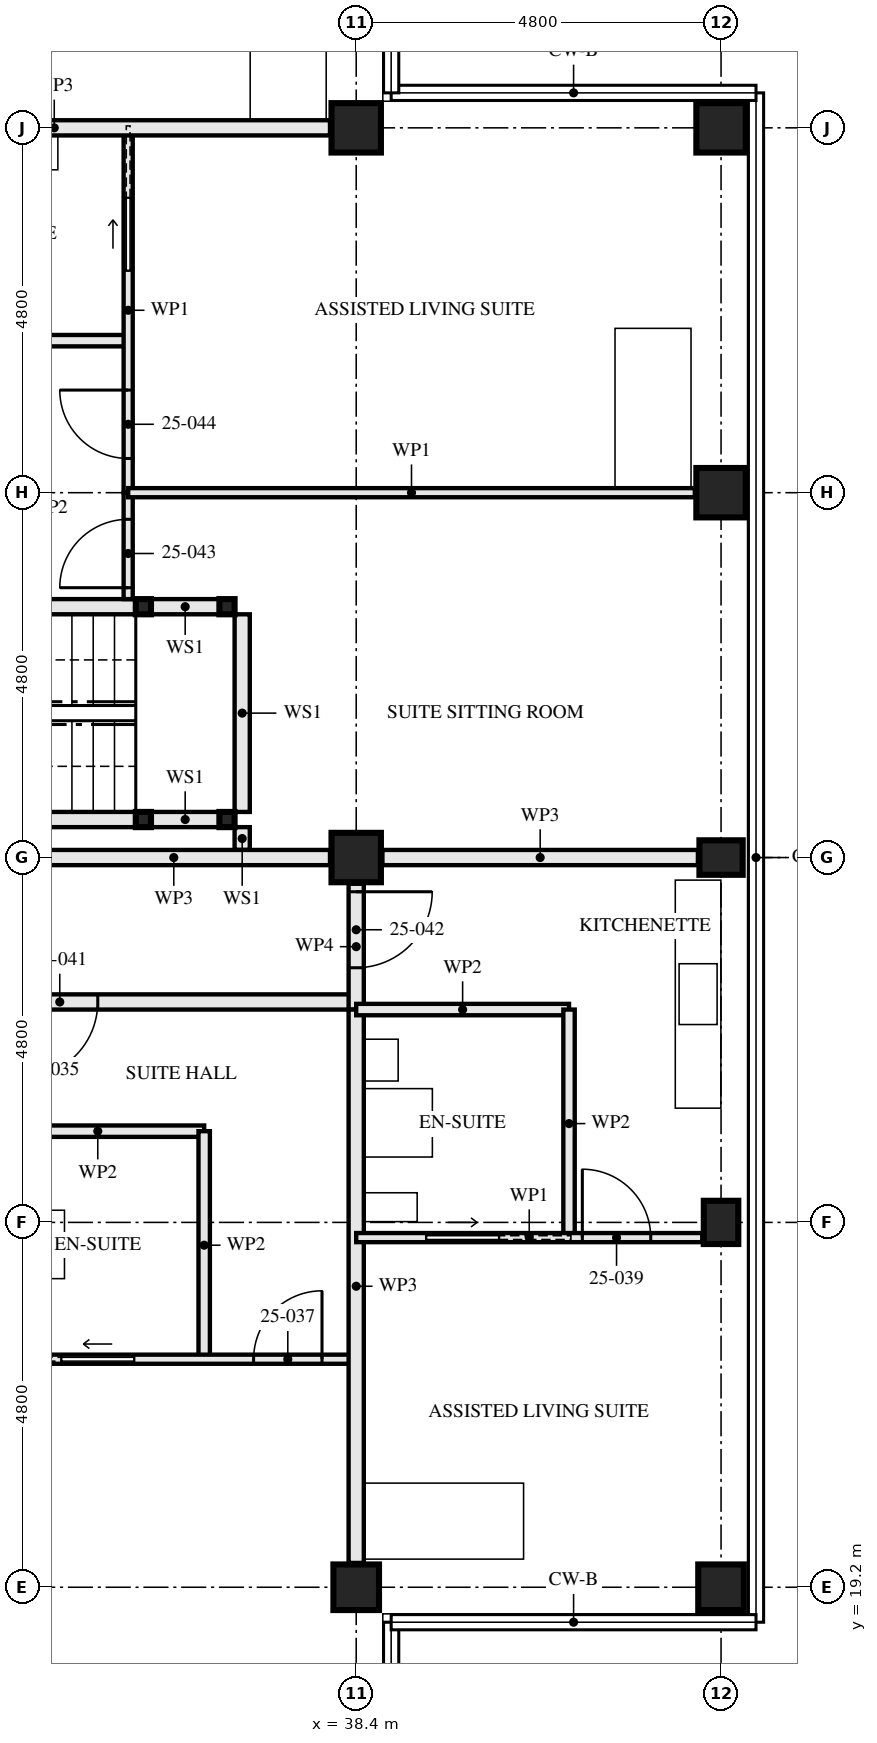
"""IFC4 building model, lengths in metres.
Left out: names, types, materials, properties, quantities, classifications, styles, units other than length and angle.
Written with IfcOpenShell. Run it as: python <this file> out.ifc"""

import sys

from ifc_helpers import new_model, si_unit, direction, frame, frame_2d, origin, origin_2d, place, context, subcontext, project, spatial, rectangle, hollow_rectangle, i_section, extrude, element, fill, save


model = new_model("IFC4")
c1 = context("Model", 3, precision=1e-05, world=origin(), true_north=direction((0.0, 1.0)))
c2 = subcontext(c1, "Body", "Model", "MODEL_VIEW")
j1 = project(units=[si_unit("LENGTHUNIT", "METRE"), si_unit("PLANEANGLEUNIT", "RADIAN")], contexts=[c1])
p1 = place(None, origin())
s1 = spatial("IfcSite", under=j1, at=p1, CompositionType="ELEMENT")
p2 = place(p1, origin())
s2 = spatial("IfcBuilding", under=s1, at=p2, CompositionType="ELEMENT")
p3 = place(p2, frame((0.0, 0.0, 94.5)))
s3 = spatial("IfcBuildingStorey", under=s2, at=p3, CompositionType="ELEMENT", Elevation=94.5)
p4 = place(p3, frame((38.4, 19.2, 0.0), z_axis=(0.0, 0.0, 1.0), x_axis=(0.0, 1.0, 0.0)))
e1 = element("IfcColumn", 1, at=p4, inside=s3, PredefinedType="COLUMN", context=c2, shape_type="SweptSolid", body=[
    extrude(hollow_rectangle(XDim=0.6, YDim=0.6, WallThickness=0.05, at=origin_2d()), origin(), (0.0, 0.0, 1.0), 3.5),
])
p5 = place(p3, frame((38.4, 28.8, 0.0), z_axis=(0.0, 0.0, 1.0), x_axis=(0.0, 1.0, 0.0)))
e2 = element("IfcColumn", 2, at=p5, inside=s3, PredefinedType="COLUMN", context=c2, shape_type="SweptSolid", body=[
    extrude(hollow_rectangle(XDim=0.65, YDim=0.65, WallThickness=0.05, at=origin_2d()), origin(), (0.0, 0.0, 1.0), 3.5),
])
p6 = place(p3, frame((38.4, 38.4, 0.0), z_axis=(0.0, 0.0, 1.0), x_axis=(0.0, 1.0, 0.0)))
e3 = element("IfcColumn", 3, at=p6, inside=s3, PredefinedType="COLUMN", context=c2, shape_type="SweptSolid", body=[
    extrude(hollow_rectangle(XDim=0.65, YDim=0.65, WallThickness=0.08, at=origin_2d()), origin(), (0.0, 0.0, 1.0), 3.5),
])
p7 = place(p3, frame((43.2, 19.2, 0.0), z_axis=(0.0, 0.0, 1.0), x_axis=(0.0, 1.0, 0.0)))
e4 = element("IfcColumn", 4, at=p7, inside=s3, PredefinedType="COLUMN", context=c2, shape_type="SweptSolid", body=[
    extrude(hollow_rectangle(XDim=0.6, YDim=0.6, WallThickness=0.05, at=origin_2d()), origin(), (0.0, 0.0, 1.0), 3.5),
])
for number, where, z_axis, x_axis in (
    (5, (43.2, 24.0, 0.0), (0.0, 0.0, 1.0), (1.0, 0.0, 0.0)),
    (6, (43.2, 28.8, 0.0), (0.0, 0.0, 1.0), (0.0, 1.0, 0.0)),
):
    element("IfcColumn", number, at=place(p3, frame(where, z_axis=z_axis, x_axis=x_axis)), inside=s3, PredefinedType="COLUMN", context=c2, shape_type="SweptSolid", body=[
        extrude(i_section(OverallWidth=0.454, OverallDepth=0.569, WebThickness=0.078, FlangeThickness=0.125, FilletRadius=0.015, at=origin_2d()), origin(), (0.0, 0.0, 1.0), 3.5),
    ])
for number, where, z_axis, x_axis in (
    (7, (43.2, 33.6, 0.0), (0.0, 0.0, 1.0), (1.0, 0.0, 0.0)),
    (8, (43.2, 38.4, 0.0), (0.0, 0.0, 1.0), (0.0, 1.0, 0.0)),
):
    element("IfcColumn", number, at=place(p3, frame(where, z_axis=z_axis, x_axis=x_axis)), inside=s3, PredefinedType="COLUMN", context=c2, shape_type="SweptSolid", body=[
        extrude(hollow_rectangle(XDim=0.65, YDim=0.65, WallThickness=0.08, at=origin_2d()), origin(), (0.0, 0.0, 1.0), 3.5),
    ])
for number, where, z_axis, x_axis in (
    (9, (36.7, 29.3, 0.0), (0.0, 0.0, 1.0), (1.0, 0.0, 0.0)),
    (10, (36.7, 32.1, 0.0), (0.0, 0.0, 1.0), (1.0, 0.0, 0.0)),
    (11, (35.6, 29.3, 0.0), (0.0, 0.0, 1.0), (1.0, 0.0, 0.0)),
    (12, (35.6, 32.1, 0.0), (0.0, 0.0, 1.0), (1.0, 0.0, 0.0)),
):
    element("IfcColumn", number, at=place(p3, frame(where, z_axis=z_axis, x_axis=x_axis)), inside=s3, PredefinedType="COLUMN", context=c2, shape_type="SweptSolid", body=[
        extrude(hollow_rectangle(XDim=0.2, YDim=0.2, WallThickness=0.008, at=origin_2d()), origin(), (0.0, 0.0, 1.0), 3.33),
    ])
p8 = place(p3, frame((36.4, 22.2, 0.0), z_axis=(0.0, 0.0, 1.0), x_axis=(0.0, 1.0, 0.0)))
e13 = element("IfcWall", 13, at=p8, inside=s3, PredefinedType="PARTITIONING", context=c2, shape_type="SweptSolid", body=[
    extrude(rectangle(XDim=3.0, YDim=0.15, at=frame_2d((1.5, 0.0))), origin(), (0.0, 0.0, 1.0), 2.55),
])
p9 = place(p3, frame((33.6, 25.2, 0.0), z_axis=(0.0, 0.0, 1.0), x_axis=(1.0, 0.0, 0.0)))
e14 = element("IfcWall", 14, at=p9, inside=s3, PredefinedType="PARTITIONING", context=c2, shape_type="SweptSolid", body=[
    extrude(rectangle(XDim=2.8, YDim=0.15, at=frame_2d((1.4, 0.0))), origin(), (0.0, 0.0, 1.0), 3.33),
])
p10 = place(p3, frame((33.6, 22.2, 0.0), z_axis=(0.0, 0.0, 1.0), x_axis=(1.0, 0.0, 0.0)))
e15 = element("IfcWall", 15, at=p10, inside=s3, PredefinedType="PARTITIONING", context=c2, shape_type="SweptSolid", body=[
    extrude(rectangle(XDim=4.8, YDim=0.12, at=frame_2d((2.4, 0.0))), origin(), (0.0, 0.0, 1.0), 3.33),
])
p11 = place(p10, frame((3.45, 0.0, 0.0)))
e16 = element("IfcOpeningElement", 16, at=p11, cuts=e15, PredefinedType="OPENING", context=c2, shape_type="SweptSolid", body=[
    extrude(rectangle(XDim=0.9, YDim=2.1, at=frame_2d((0.45, 1.05))), frame((0.0, 0.071, 0.0), z_axis=(0.0, -1.0, 0.0), x_axis=(1.0, 0.0, 0.0)), (0.0, 0.0, 1.0), 0.141),
])
p12 = place(p10, frame((0.925, 0.0, 0.0)))
e17 = element("IfcOpeningElement", 17, at=p12, cuts=e15, PredefinedType="OPENING", context=c2, shape_type="SweptSolid", body=[
    extrude(rectangle(XDim=0.95, YDim=2.1, at=frame_2d((0.475, 1.05))), frame((0.0, 0.071, 0.0), z_axis=(0.0, -1.0, 0.0), x_axis=(1.0, 0.0, 0.0)), (0.0, 0.0, 1.0), 0.141),
])
p13 = place(p3, frame((38.4, 19.52, 0.0), z_axis=(0.0, 0.0, 1.0), x_axis=(0.0, 1.0, 0.0)))
e18 = element("IfcWall", 18, at=p13, inside=s3, PredefinedType="PARTITIONING", context=c2, shape_type="SweptSolid", body=[
    extrude(rectangle(XDim=7.28, YDim=0.2, at=frame_2d((3.64, 0.0))), origin(), (0.0, 0.0, 1.0), 2.55),
])
p14 = place(p3, frame((41.2, 23.8, 0.0), z_axis=(0.0, 0.0, 1.0), x_axis=(0.0, 1.0, 0.0)))
e19 = element("IfcWall", 19, at=p14, inside=s3, PredefinedType="PARTITIONING", context=c2, shape_type="SweptSolid", body=[
    extrude(rectangle(XDim=3.0, YDim=0.15, at=frame_2d((1.5, 0.0))), origin(), (0.0, 0.0, 1.0), 2.55),
])
p15 = place(p3, frame((38.4, 26.8, 0.0), z_axis=(0.0, 0.0, 1.0), x_axis=(1.0, 0.0, 0.0)))
e20 = element("IfcWall", 20, at=p15, inside=s3, PredefinedType="PARTITIONING", context=c2, shape_type="SweptSolid", body=[
    extrude(rectangle(XDim=2.8, YDim=0.15, at=frame_2d((1.4, 0.0))), origin(), (0.0, 0.0, 1.0), 3.33),
])
p16 = place(p3, frame((38.4, 23.8, 0.0), z_axis=(0.0, 0.0, 1.0), x_axis=(1.0, 0.0, 0.0)))
e21 = element("IfcWall", 21, at=p16, inside=s3, PredefinedType="PARTITIONING", context=c2, shape_type="SweptSolid", body=[
    extrude(rectangle(XDim=4.553, YDim=0.12, at=frame_2d((2.276, 0.0))), origin(), (0.0, 0.0, 1.0), 3.33),
])
p17 = place(p16, frame((2.975, 0.0, 0.0)))
e22 = element("IfcOpeningElement", 22, at=p17, cuts=e21, PredefinedType="OPENING", context=c2, shape_type="SweptSolid", body=[
    extrude(rectangle(XDim=0.9, YDim=2.1, at=frame_2d((0.45, 1.05))), frame((0.0, 0.071, 0.0), z_axis=(0.0, -1.0, 0.0), x_axis=(1.0, 0.0, 0.0)), (0.0, 0.0, 1.0), 0.141),
])
p18 = place(p16, frame((0.925, 0.0, 0.0)))
e23 = element("IfcOpeningElement", 23, at=p18, cuts=e21, PredefinedType="OPENING", context=c2, shape_type="SweptSolid", body=[
    extrude(rectangle(XDim=0.95, YDim=2.1, at=frame_2d((0.475, 1.05))), frame((0.0, 0.071, 0.0), z_axis=(0.0, -1.0, 0.0), x_axis=(1.0, 0.0, 0.0)), (0.0, 0.0, 1.0), 0.141),
])
p19 = place(p3, frame((28.8, 26.9, 0.0), z_axis=(0.0, 0.0, 1.0), x_axis=(1.0, 0.0, 0.0)))
e24 = element("IfcWall", 24, at=p19, inside=s3, PredefinedType="PARTITIONING", context=c2, shape_type="SweptSolid", body=[
    extrude(rectangle(XDim=9.6, YDim=0.2, at=frame_2d((4.8, 0.0))), origin(), (0.0, 0.0, 1.0), 3.33),
])
p20 = place(p19, frame((5.2, 0.0, 0.0)))
e25 = element("IfcOpeningElement", 25, at=p20, cuts=e24, PredefinedType="OPENING", context=c2, shape_type="SweptSolid", body=[
    extrude(rectangle(XDim=1.0, YDim=2.1, at=frame_2d((0.5, 1.05))), frame((0.0, 0.111, 0.0), z_axis=(0.0, -1.0, 0.0), x_axis=(1.0, 0.0, 0.0)), (0.0, 0.0, 1.0), 0.221),
])
p21 = place(p3, frame((38.4, 26.8, 0.0), z_axis=(0.0, 0.0, 1.0), x_axis=(0.0, 1.0, 0.0)))
e26 = element("IfcWall", 26, at=p21, inside=s3, PredefinedType="PARTITIONING", context=c2, shape_type="SweptSolid", body=[
    extrude(rectangle(XDim=1.655, YDim=0.2, at=frame_2d((0.828, 0.0))), origin(), (0.0, 0.0, 1.0), 3.33),
])
p22 = place(p21, frame((0.55, 0.0, 0.0)))
e27 = element("IfcOpeningElement", 27, at=p22, cuts=e26, PredefinedType="OPENING", context=c2, shape_type="SweptSolid", body=[
    extrude(rectangle(XDim=1.0, YDim=2.1, at=frame_2d((0.5, 1.05))), frame((0.0, 0.111, 0.0), z_axis=(0.0, -1.0, 0.0), x_axis=(1.0, 0.0, 0.0)), (0.0, 0.0, 1.0), 0.221),
])
p23 = place(p3, frame((36.6, 29.3, 0.0), z_axis=(0.0, 0.0, 1.0), x_axis=(-1.0, 0.0, 0.0)))
e28 = element("IfcWall", 28, at=p23, inside=s3, PredefinedType="SOLIDWALL", context=c2, shape_type="SweptSolid", body=[
    extrude(rectangle(XDim=0.9, YDim=0.2, at=frame_2d((0.45, 0.0))), origin(), (0.0, 0.0, 1.0), 2.99),
])
p24 = place(p3, frame((35.5, 29.3, 0.0), z_axis=(0.0, 0.0, 1.0), x_axis=(-1.0, 0.0, 0.0)))
e29 = element("IfcWall", 29, at=p24, inside=s3, PredefinedType="SOLIDWALL", context=c2, shape_type="SweptSolid", body=[
    extrude(rectangle(XDim=4.7, YDim=0.2, at=frame_2d((2.35, 0.0))), origin(), (0.0, 0.0, 1.0), 2.99),
])
p25 = place(p3, frame((36.6, 32.1, 0.0), z_axis=(0.0, 0.0, 1.0), x_axis=(-1.0, 0.0, 0.0)))
e30 = element("IfcWall", 30, at=p25, inside=s3, PredefinedType="SOLIDWALL", context=c2, shape_type="SweptSolid", body=[
    extrude(rectangle(XDim=0.9, YDim=0.2, at=frame_2d((0.45, 0.0))), origin(), (0.0, 0.0, 1.0), 2.99),
])
p26 = place(p3, frame((35.5, 32.1, 0.0), z_axis=(0.0, 0.0, 1.0), x_axis=(-1.0, 0.0, 0.0)))
e31 = element("IfcWall", 31, at=p26, inside=s3, PredefinedType="SOLIDWALL", context=c2, shape_type="SweptSolid", body=[
    extrude(rectangle(XDim=4.7, YDim=0.2, at=frame_2d((2.35, 0.0))), origin(), (0.0, 0.0, 1.0), 2.99),
])
p27 = place(p3, frame((36.9, 28.9, 0.0), z_axis=(0.0, 0.0, 1.0), x_axis=(0.0, 1.0, 0.0)))
e32 = element("IfcWall", 32, at=p27, inside=s3, PredefinedType="SOLIDWALL", context=c2, shape_type="SweptSolid", body=[
    extrude(rectangle(XDim=0.3, YDim=0.2, at=frame_2d((0.15, 0.0))), origin(), (0.0, 0.0, 1.0), 3.33),
])
p28 = place(p3, frame((36.9, 29.4, 0.0), z_axis=(0.0, 0.0, 1.0), x_axis=(0.0, 1.0, 0.0)))
e33 = element("IfcWall", 33, at=p28, inside=s3, PredefinedType="SOLIDWALL", context=c2, shape_type="SweptSolid", body=[
    extrude(rectangle(XDim=2.6, YDim=0.2, at=frame_2d((1.3, 0.0))), origin(), (0.0, 0.0, 1.0), 3.33),
])
p29 = place(p3, frame((35.4, 35.6, 0.0), z_axis=(0.0, 0.0, 1.0), x_axis=(-1.0, 0.0, 0.0)))
e34 = element("IfcWall", 34, at=p29, inside=s3, PredefinedType="PARTITIONING", context=c2, shape_type="SweptSolid", body=[
    extrude(rectangle(XDim=3.0, YDim=0.15, at=frame_2d((1.5, 0.0))), origin(), (0.0, 0.0, 1.0), 3.33),
])
p30 = place(p3, frame((35.4, 32.2, 0.0), z_axis=(0.0, 0.0, 1.0), x_axis=(0.0, 1.0, 0.0)))
e35 = element("IfcWall", 35, at=p30, inside=s3, PredefinedType="PARTITIONING", context=c2, shape_type="SweptSolid", body=[
    extrude(rectangle(XDim=1.4, YDim=0.12, at=frame_2d((0.7, 0.0))), origin(), (0.0, 0.0, 1.0), 3.33),
])
p31 = place(p30, frame((0.15, 0.0, 0.0)))
e36 = element("IfcOpeningElement", 36, at=p31, cuts=e35, PredefinedType="OPENING", context=c2, shape_type="SweptSolid", body=[
    extrude(rectangle(XDim=0.9, YDim=2.1, at=frame_2d((0.45, 1.05))), frame((0.0, 0.071, 0.0), z_axis=(0.0, -1.0, 0.0), x_axis=(1.0, 0.0, 0.0)), (0.0, 0.0, 1.0), 0.141),
])
p32 = place(p3, frame((35.4, 33.6, 0.0), z_axis=(0.0, 0.0, 1.0), x_axis=(0.0, 1.0, 0.0)))
e37 = element("IfcWall", 37, at=p32, inside=s3, PredefinedType="PARTITIONING", context=c2, shape_type="SweptSolid", body=[
    extrude(rectangle(XDim=4.8, YDim=0.12, at=frame_2d((2.4, 0.0))), origin(), (0.0, 0.0, 1.0), 3.33),
])
p33 = place(p32, frame((0.45, 0.0, 0.0)))
e38 = element("IfcOpeningElement", 38, at=p33, cuts=e37, PredefinedType="OPENING", context=c2, shape_type="SweptSolid", body=[
    extrude(rectangle(XDim=0.9, YDim=2.1, at=frame_2d((0.45, 1.05))), frame((0.0, 0.071, 0.0), z_axis=(0.0, -1.0, 0.0), x_axis=(1.0, 0.0, 0.0)), (0.0, 0.0, 1.0), 0.141),
])
p34 = place(p32, frame((2.925, 0.0, 0.0)))
e39 = element("IfcOpeningElement", 39, at=p34, cuts=e37, PredefinedType="OPENING", context=c2, shape_type="SweptSolid", body=[
    extrude(rectangle(XDim=0.95, YDim=2.1, at=frame_2d((0.475, 1.05))), frame((0.0, 0.071, 0.0), z_axis=(0.0, -1.0, 0.0), x_axis=(1.0, 0.0, 0.0)), (0.0, 0.0, 1.0), 0.141),
])
p35 = place(p3, frame((42.855, 33.6, 0.0), z_axis=(0.0, 0.0, 1.0), x_axis=(-1.0, 0.0, 0.0)))
e40 = element("IfcWall", 40, at=p35, inside=s3, PredefinedType="PARTITIONING", context=c2, shape_type="SweptSolid", body=[
    extrude(rectangle(XDim=7.455, YDim=0.12, at=frame_2d((3.728, 0.0))), origin(), (0.0, 0.0, 1.0), 2.55),
])
p36 = place(p3, frame((38.055, 38.4, 0.0), z_axis=(0.0, 0.0, 1.0), x_axis=(-1.0, 0.0, 0.0)))
e41 = element("IfcWall", 41, at=p36, inside=s3, PredefinedType="PARTITIONING", context=c2, shape_type="SweptSolid", body=[
    extrude(rectangle(XDim=7.255, YDim=0.2, at=frame_2d((3.627, 0.0))), origin(), (0.0, 0.0, 1.0), 2.55),
])
p37 = place(p3, frame((42.896, 28.8, 0.0), z_axis=(0.0, 0.0, 1.0), x_axis=(-1.0, 0.0, 0.0)))
e42 = element("IfcWall", 42, at=p37, inside=s3, PredefinedType="PARTITIONING", context=c2, shape_type="SweptSolid", body=[
    extrude(rectangle(XDim=4.15, YDim=0.2, at=frame_2d((2.075, 0.0))), origin(), (0.0, 0.0, 1.0), 2.32),
])
p38 = place(p3, frame((38.055, 28.8, 0.0), z_axis=(0.0, 0.0, 1.0), x_axis=(-1.0, 0.0, 0.0)))
e43 = element("IfcWall", 43, at=p38, inside=s3, PredefinedType="PARTITIONING", context=c2, shape_type="SweptSolid", body=[
    extrude(rectangle(XDim=4.11, YDim=0.2, at=frame_2d((2.055, 0.0))), origin(), (0.0, 0.0, 1.0), 2.32),
])
p39 = place(p11, origin())
e44 = element("IfcDoor", 44, at=p39, inside=s3, OperationType="SINGLE_SWING_LEFT", PredefinedType="DOOR", context=c2, shape_type="SweptSolid", body=[
    extrude(rectangle(XDim=0.9, YDim=2.1, at=frame_2d((0.45, 1.05))), frame((0.0, 0.022, 0.0), z_axis=(0.0, -1.0, 0.0), x_axis=(1.0, 0.0, 0.0)), (0.0, 0.0, 1.0), 0.044),
])
fill(e16, e44)
p40 = place(p12, origin())
e45 = element("IfcDoor", 45, at=p40, inside=s3, OperationType="SLIDING_TO_RIGHT", PredefinedType="DOOR", context=c2, shape_type="SweptSolid", body=[
    extrude(rectangle(XDim=0.95, YDim=2.1, at=frame_2d((0.475, 1.05))), frame((0.0, 0.022, 0.0), z_axis=(0.0, -1.0, 0.0), x_axis=(1.0, 0.0, 0.0)), (0.0, 0.0, 1.0), 0.044),
])
fill(e17, e45)
p41 = place(p17, origin())
e46 = element("IfcDoor", 46, at=p41, inside=s3, OperationType="SINGLE_SWING_RIGHT", PredefinedType="DOOR", context=c2, shape_type="SweptSolid", body=[
    extrude(rectangle(XDim=0.9, YDim=2.1, at=frame_2d((0.45, 1.05))), frame((0.0, 0.022, 0.0), z_axis=(0.0, -1.0, 0.0), x_axis=(1.0, 0.0, 0.0)), (0.0, 0.0, 1.0), 0.044),
])
fill(e22, e46)
p42 = place(p18, origin())
e47 = element("IfcDoor", 47, at=p42, inside=s3, OperationType="SLIDING_TO_LEFT", PredefinedType="DOOR", context=c2, shape_type="SweptSolid", body=[
    extrude(rectangle(XDim=0.95, YDim=2.1, at=frame_2d((0.475, 1.05))), frame((0.0, 0.022, 0.0), z_axis=(0.0, -1.0, 0.0), x_axis=(1.0, 0.0, 0.0)), (0.0, 0.0, 1.0), 0.044),
])
fill(e23, e47)
p43 = place(p20, frame((1.0, 0.0, 0.0), z_axis=(0.0, 0.0, 1.0), x_axis=(-1.0, 0.0, 0.0)))
e48 = element("IfcDoor", 48, at=p43, inside=s3, OperationType="SINGLE_SWING_LEFT", PredefinedType="DOOR", context=c2, shape_type="SweptSolid", body=[
    extrude(rectangle(XDim=1.0, YDim=2.1, at=frame_2d((0.5, 1.05))), frame((0.0, 0.027, 0.0), z_axis=(0.0, -1.0, 0.0), x_axis=(1.0, 0.0, 0.0)), (0.0, 0.0, 1.0), 0.054),
])
fill(e25, e48)
p44 = place(p22, frame((1.0, 0.0, 0.0), z_axis=(0.0, 0.0, 1.0), x_axis=(-1.0, 0.0, 0.0)))
e49 = element("IfcDoor", 49, at=p44, inside=s3, OperationType="SINGLE_SWING_RIGHT", PredefinedType="DOOR", context=c2, shape_type="SweptSolid", body=[
    extrude(rectangle(XDim=1.0, YDim=2.1, at=frame_2d((0.5, 1.05))), frame((0.0, 0.027, 0.0), z_axis=(0.0, -1.0, 0.0), x_axis=(1.0, 0.0, 0.0)), (0.0, 0.0, 1.0), 0.054),
])
fill(e27, e49)
p45 = place(p31, origin())
e50 = element("IfcDoor", 50, at=p45, inside=s3, OperationType="SINGLE_SWING_RIGHT", PredefinedType="DOOR", context=c2, shape_type="SweptSolid", body=[
    extrude(rectangle(XDim=0.9, YDim=2.1, at=frame_2d((0.45, 1.05))), frame((0.0, 0.022, 0.0), z_axis=(0.0, -1.0, 0.0), x_axis=(1.0, 0.0, 0.0)), (0.0, 0.0, 1.0), 0.044),
])
fill(e36, e50)
p46 = place(p33, origin())
e51 = element("IfcDoor", 51, at=p46, inside=s3, OperationType="SINGLE_SWING_LEFT", PredefinedType="DOOR", context=c2, shape_type="SweptSolid", body=[
    extrude(rectangle(XDim=0.9, YDim=2.1, at=frame_2d((0.45, 1.05))), frame((0.0, 0.022, 0.0), z_axis=(0.0, -1.0, 0.0), x_axis=(1.0, 0.0, 0.0)), (0.0, 0.0, 1.0), 0.044),
])
fill(e38, e51)
p47 = place(p34, origin())
e52 = element("IfcDoor", 52, at=p47, inside=s3, OperationType="SLIDING_TO_LEFT", PredefinedType="DOOR", context=c2, shape_type="SweptSolid", body=[
    extrude(rectangle(XDim=0.95, YDim=2.1, at=frame_2d((0.475, 1.05))), frame((0.0, 0.022, 0.0), z_axis=(0.0, -1.0, 0.0), x_axis=(1.0, 0.0, 0.0)), (0.0, 0.0, 1.0), 0.044),
])
fill(e39, e52)
save(model, sys.argv[1])
